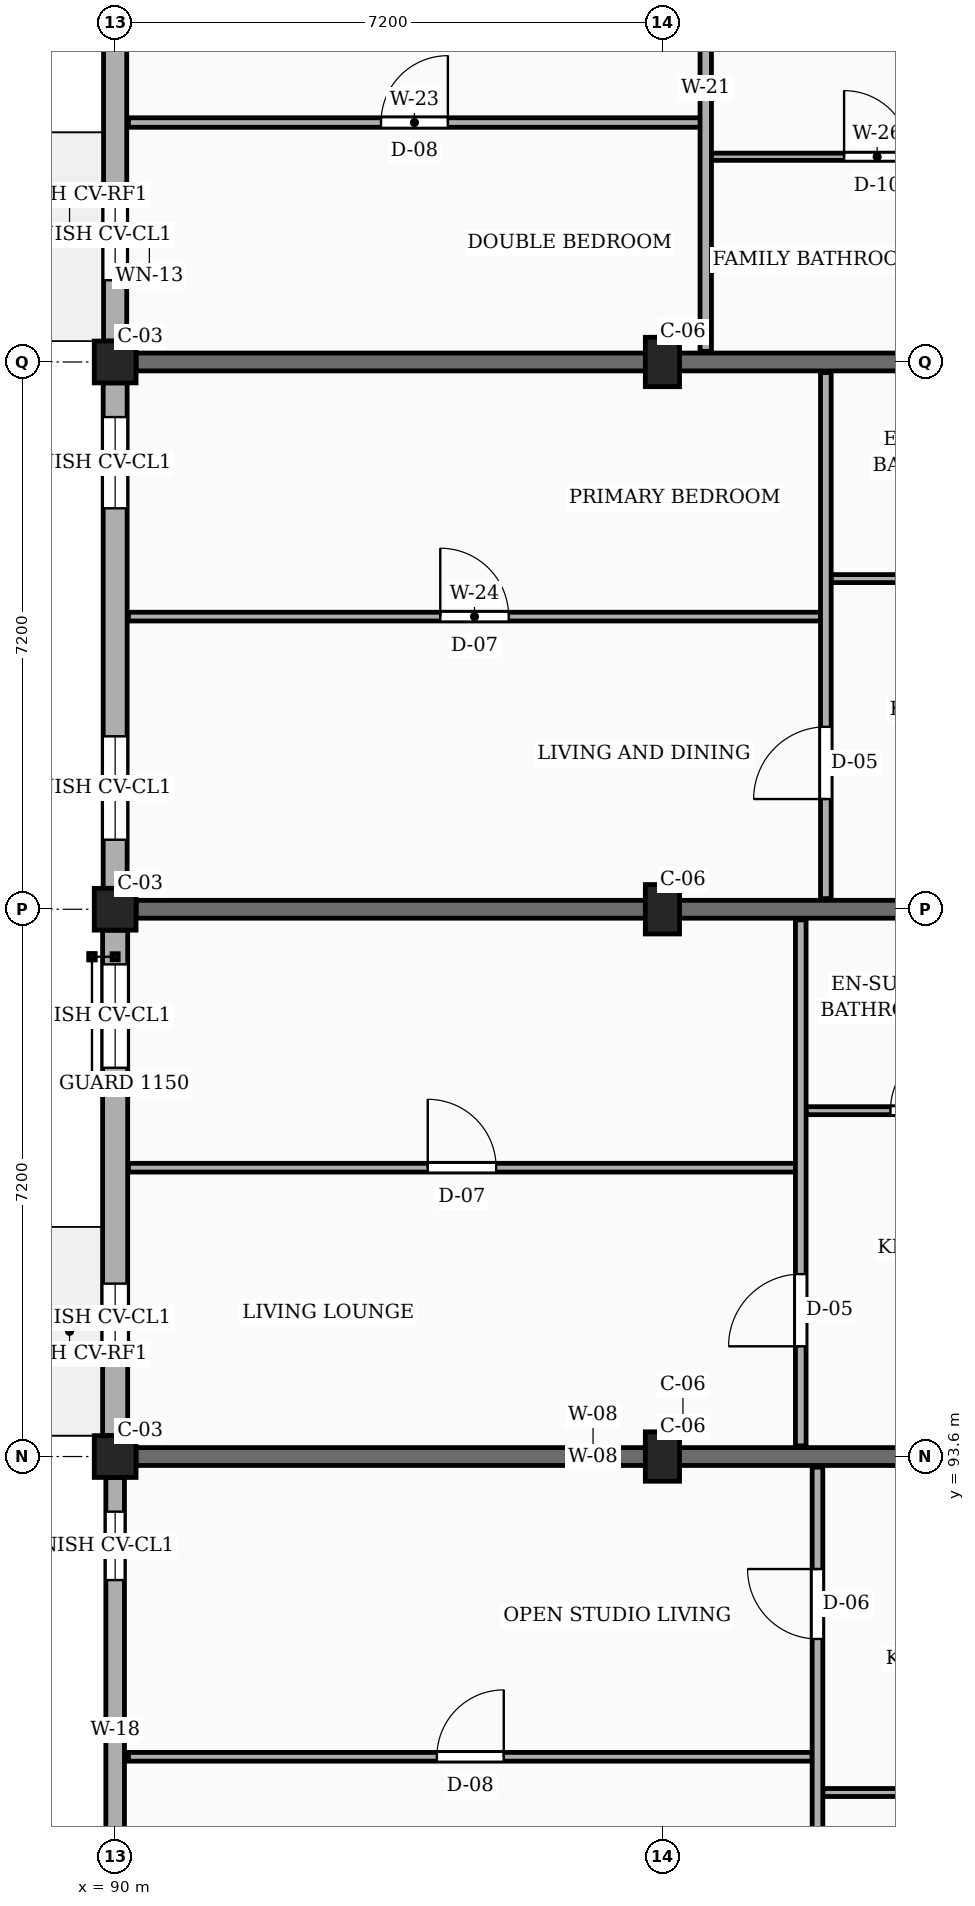
"""IFC4 building model, lengths in metres.
Left out: names, types, materials, properties, quantities, classifications, styles, units other than length and angle.
Written with IfcOpenShell. Run it as: python <this file> out.ifc"""

import sys

from ifc_helpers import new_model, si_unit, direction, frame, frame_2d, origin, origin_2d, place, context, subcontext, project, spatial, rectangle, extrude, element, fill, save


model = new_model("IFC4")
c1 = context("Model", 3, precision=1e-05, world=origin(), true_north=direction((0.0, 1.0)))
c2 = subcontext(c1, "Body", "Model", "MODEL_VIEW")
j1 = project(units=[si_unit("LENGTHUNIT", "METRE"), si_unit("PLANEANGLEUNIT", "RADIAN")], contexts=[c1])
p1 = place(None, origin())
s1 = spatial("IfcSite", under=j1, at=p1, CompositionType="ELEMENT")
p2 = place(p1, origin())
s2 = spatial("IfcBuilding", under=s1, at=p2, CompositionType="ELEMENT")
p3 = place(p2, frame((0.0, 0.0, 20.25)))
s3 = spatial("IfcBuildingStorey", under=s2, at=p3, CompositionType="ELEMENT", Elevation=20.25)
for number, where, z_axis, x_axis in (
    (1, (90.0, 93.6, 0.0), (0.0, 0.0, 1.0), (1.0, 0.0, 0.0)),
    (2, (90.0, 100.8, 0.0), (0.0, 0.0, 1.0), (1.0, 0.0, 0.0)),
    (3, (90.0, 108.0, 0.0), (0.0, 0.0, 1.0), (1.0, 0.0, 0.0)),
):
    element("IfcColumn", number, at=place(p3, frame(where, z_axis=z_axis, x_axis=x_axis)), inside=s3, PredefinedType="COLUMN", context=c2, shape_type="SweptSolid", body=[
        extrude(rectangle(XDim=0.55, YDim=0.55, at=origin_2d()), origin(), (0.0, 0.0, 1.0), 3.15),
    ])
for number, where, z_axis, x_axis in (
    (4, (97.2, 93.6, 0.0), (0.0, 0.0, 1.0), (1.0, 0.0, 0.0)),
    (5, (97.2, 100.8, 0.0), (0.0, 0.0, 1.0), (1.0, 0.0, 0.0)),
    (6, (97.2, 108.0, 0.0), (0.0, 0.0, 1.0), (1.0, 0.0, 0.0)),
):
    element("IfcColumn", number, at=place(p3, frame(where, z_axis=z_axis, x_axis=x_axis)), inside=s3, PredefinedType="COLUMN", context=c2, shape_type="SweptSolid", body=[
        extrude(rectangle(XDim=0.45, YDim=0.65, at=origin_2d()), origin(), (0.0, 0.0, 1.0), 3.15),
    ])
for number, where, z_axis, x_axis in (
    (7, (90.275, 93.6, 0.0), (0.0, 0.0, 1.0), (1.0, 0.0, 0.0)),
    (8, (90.275, 100.8, 0.0), (0.0, 0.0, 1.0), (1.0, 0.0, 0.0)),
    (9, (90.275, 108.0, 0.0), (0.0, 0.0, 1.0), (1.0, 0.0, 0.0)),
):
    element("IfcWall", number, at=place(p3, frame(where, z_axis=z_axis, x_axis=x_axis)), inside=s3, PredefinedType="SOLIDWALL", context=c2, shape_type="SweptSolid", body=[
        extrude(rectangle(XDim=12.025, YDim=0.235, at=frame_2d((6.013, 0.0))), origin(), (0.0, 0.0, 1.0), 2.19),
    ])
p4 = place(p3, frame((90.0, 114.925, 0.0), z_axis=(0.0, 0.0, 1.0), x_axis=(0.0, -1.0, 0.0)))
e10 = element("IfcWall", 10, at=p4, inside=s3, PredefinedType="SOLIDWALL", context=c2, shape_type="SweptSolid", body=[
    extrude(rectangle(XDim=6.65, YDim=0.305, at=frame_2d((3.325, 0.0))), origin(), (0.0, 0.0, 1.0), 2.46),
])
p5 = place(p4, frame((0.45, 0.0, 0.78)))
e11 = element("IfcOpeningElement", 11, at=p5, cuts=e10, PredefinedType="OPENING", context=c2, shape_type="SweptSolid", body=[
    extrude(rectangle(XDim=1.04, YDim=1.26, at=frame_2d((0.52, 0.63))), frame((0.0, 0.163, 0.0), z_axis=(0.0, -1.0, 0.0), x_axis=(1.0, 0.0, 0.0)), (0.0, 0.0, 1.0), 0.325),
])
p6 = place(p4, frame((4.65, 0.0, 0.78)))
e12 = element("IfcOpeningElement", 12, at=p6, cuts=e10, PredefinedType="OPENING", context=c2, shape_type="SweptSolid", body=[
    extrude(rectangle(XDim=1.2, YDim=1.26, at=frame_2d((0.6, 0.63))), frame((0.0, 0.163, 0.0), z_axis=(0.0, -1.0, 0.0), x_axis=(1.0, 0.0, 0.0)), (0.0, 0.0, 1.0), 0.325),
])
p7 = place(p3, frame((90.0, 107.725, 0.0), z_axis=(0.0, 0.0, 1.0), x_axis=(0.0, -1.0, 0.0)))
e13 = element("IfcWall", 13, at=p7, inside=s3, PredefinedType="SOLIDWALL", context=c2, shape_type="SweptSolid", body=[
    extrude(rectangle(XDim=6.65, YDim=0.315, at=frame_2d((3.325, 0.0))), origin(), (0.0, 0.0, 1.0), 2.46),
])
p8 = place(p7, frame((0.45, 0.0, 0.78)))
e14 = element("IfcOpeningElement", 14, at=p8, cuts=e13, PredefinedType="OPENING", context=c2, shape_type="SweptSolid", body=[
    extrude(rectangle(XDim=1.2, YDim=1.26, at=frame_2d((0.6, 0.63))), frame((0.0, 0.167, 0.0), z_axis=(0.0, -1.0, 0.0), x_axis=(1.0, 0.0, 0.0)), (0.0, 0.0, 1.0), 0.335),
])
p9 = place(p7, frame((4.65, 0.0, 0.78)))
e15 = element("IfcOpeningElement", 15, at=p9, cuts=e13, PredefinedType="OPENING", context=c2, shape_type="SweptSolid", body=[
    extrude(rectangle(XDim=1.36, YDim=1.26, at=frame_2d((0.68, 0.63))), frame((0.0, 0.167, 0.0), z_axis=(0.0, -1.0, 0.0), x_axis=(1.0, 0.0, 0.0)), (0.0, 0.0, 1.0), 0.335),
])
p10 = place(p3, frame((90.0, 100.525, 0.0), z_axis=(0.0, 0.0, 1.0), x_axis=(0.0, -1.0, 0.0)))
e16 = element("IfcWall", 16, at=p10, inside=s3, PredefinedType="SOLIDWALL", context=c2, shape_type="SweptSolid", body=[
    extrude(rectangle(XDim=6.65, YDim=0.33, at=frame_2d((3.325, 0.0))), origin(), (0.0, 0.0, 1.0), 2.46),
])
p11 = place(p10, frame((0.45, 0.0, 0.78)))
e17 = element("IfcOpeningElement", 17, at=p11, cuts=e16, PredefinedType="OPENING", context=c2, shape_type="SweptSolid", body=[
    extrude(rectangle(XDim=1.36, YDim=1.26, at=frame_2d((0.68, 0.63))), frame((0.0, 0.175, 0.0), z_axis=(0.0, -1.0, 0.0), x_axis=(1.0, 0.0, 0.0)), (0.0, 0.0, 1.0), 0.35),
])
p12 = place(p10, frame((4.65, 0.0, 0.78)))
e18 = element("IfcOpeningElement", 18, at=p12, cuts=e16, PredefinedType="OPENING", context=c2, shape_type="SweptSolid", body=[
    extrude(rectangle(XDim=0.9, YDim=1.36, at=frame_2d((0.45, 0.68))), frame((0.0, 0.175, 0.0), z_axis=(0.0, -1.0, 0.0), x_axis=(1.0, 0.0, 0.0)), (0.0, 0.0, 1.0), 0.35),
])
p13 = place(p3, frame((90.0, 93.325, 0.0), z_axis=(0.0, 0.0, 1.0), x_axis=(0.0, -1.0, 0.0)))
e19 = element("IfcWall", 19, at=p13, inside=s3, PredefinedType="SOLIDWALL", context=c2, shape_type="SweptSolid", body=[
    extrude(rectangle(XDim=6.65, YDim=0.245, at=frame_2d((3.325, 0.0))), origin(), (0.0, 0.0, 1.0), 2.46),
])
p14 = place(p13, frame((0.45, 0.0, 0.78)))
e20 = element("IfcOpeningElement", 20, at=p14, cuts=e19, PredefinedType="OPENING", context=c2, shape_type="SweptSolid", body=[
    extrude(rectangle(XDim=0.9, YDim=1.36, at=frame_2d((0.45, 0.68))), frame((0.0, 0.133, 0.0), z_axis=(0.0, -1.0, 0.0), x_axis=(1.0, 0.0, 0.0)), (0.0, 0.0, 1.0), 0.265),
])
p15 = place(p13, frame((4.65, 0.0, 0.78)))
e21 = element("IfcOpeningElement", 21, at=p15, cuts=e19, PredefinedType="OPENING", context=c2, shape_type="SweptSolid", body=[
    extrude(rectangle(XDim=1.06, YDim=1.36, at=frame_2d((0.53, 0.68))), frame((0.0, 0.133, 0.0), z_axis=(0.0, -1.0, 0.0), x_axis=(1.0, 0.0, 0.0)), (0.0, 0.0, 1.0), 0.265),
])
p16 = place(p3, frame((90.175, 89.65, 0.0), z_axis=(0.0, 0.0, 1.0), x_axis=(1.0, 0.0, 0.0)))
e22 = element("IfcWall", 22, at=p16, inside=s3, PredefinedType="PARTITIONING", context=c2, shape_type="SweptSolid", body=[
    extrude(rectangle(XDim=8.995, YDim=0.115, at=frame_2d((4.498, 0.0))), origin(), (0.0, 0.0, 1.0), 2.325),
])
p17 = place(p16, frame((4.058, 0.0, 0.0)))
e23 = element("IfcOpeningElement", 23, at=p17, cuts=e22, PredefinedType="OPENING", context=c2, shape_type="SweptSolid", body=[
    extrude(rectangle(XDim=0.88, YDim=2.08, at=frame_2d((0.44, 1.04))), frame((0.0, 0.067, 0.0), z_axis=(0.0, -1.0, 0.0), x_axis=(1.0, 0.0, 0.0)), (0.0, 0.0, 1.0), 0.135),
])
p18 = place(p3, frame((99.31, 89.18, 0.0), z_axis=(0.0, 0.0, 1.0), x_axis=(1.0, 0.0, 0.0)))
e24 = element("IfcWall", 24, at=p18, inside=s3, PredefinedType="PARTITIONING", context=c2, shape_type="SweptSolid", body=[
    extrude(rectangle(XDim=2.9, YDim=0.105, at=frame_2d((1.45, 0.0))), origin(), (0.0, 0.0, 1.0), 2.325),
])
p19 = place(p18, frame((1.015, 0.0, 0.0)))
e25 = element("IfcOpeningElement", 25, at=p19, cuts=e24, PredefinedType="OPENING", context=c2, shape_type="SweptSolid", body=[
    extrude(rectangle(XDim=0.87, YDim=2.05, at=frame_2d((0.435, 1.025))), frame((0.0, 0.062, 0.0), z_axis=(0.0, -1.0, 0.0), x_axis=(1.0, 0.0, 0.0)), (0.0, 0.0, 1.0), 0.125),
])
p20 = place(p3, frame((99.24, 86.575, 0.0), z_axis=(0.0, 0.0, 1.0), x_axis=(0.0, 1.0, 0.0)))
e26 = element("IfcWall", 26, at=p20, inside=s3, PredefinedType="PARTITIONING", context=c2, shape_type="SweptSolid", body=[
    extrude(rectangle(XDim=6.885, YDim=0.14, at=frame_2d((3.442, 0.0))), origin(), (0.0, 0.0, 1.0), 2.325),
])
p21 = place(p20, frame((4.625, 0.0, 0.0)))
e27 = element("IfcOpeningElement", 27, at=p21, cuts=e26, PredefinedType="OPENING", context=c2, shape_type="SweptSolid", body=[
    extrude(rectangle(XDim=0.92, YDim=2.1, at=frame_2d((0.46, 1.05))), frame((0.0, 0.08, 0.0), z_axis=(0.0, -1.0, 0.0), x_axis=(1.0, 0.0, 0.0)), (0.0, 0.0, 1.0), 0.16),
])
p22 = place(p3, frame((90.175, 97.4, 0.0), z_axis=(0.0, 0.0, 1.0), x_axis=(1.0, 0.0, 0.0)))
e28 = element("IfcWall", 28, at=p22, inside=s3, PredefinedType="PARTITIONING", context=c2, shape_type="SweptSolid", body=[
    extrude(rectangle(XDim=8.775, YDim=0.115, at=frame_2d((4.387, 0.0))), origin(), (0.0, 0.0, 1.0), 2.325),
])
p23 = place(p22, frame((3.938, 0.0, 0.0)))
e29 = element("IfcOpeningElement", 29, at=p23, cuts=e28, PredefinedType="OPENING", context=c2, shape_type="SweptSolid", body=[
    extrude(rectangle(XDim=0.9, YDim=2.1, at=frame_2d((0.45, 1.05))), frame((0.0, 0.067, 0.0), z_axis=(0.0, -1.0, 0.0), x_axis=(1.0, 0.0, 0.0)), (0.0, 0.0, 1.0), 0.135),
])
p24 = place(p3, frame((99.09, 98.15, 0.0), z_axis=(0.0, 0.0, 1.0), x_axis=(1.0, 0.0, 0.0)))
e30 = element("IfcWall", 30, at=p24, inside=s3, PredefinedType="PARTITIONING", context=c2, shape_type="SweptSolid", body=[
    extrude(rectangle(XDim=3.12, YDim=0.105, at=frame_2d((1.56, 0.0))), origin(), (0.0, 0.0, 1.0), 2.325),
])
p25 = place(p24, frame((1.11, 0.0, 0.0)))
e31 = element("IfcOpeningElement", 31, at=p25, cuts=e30, PredefinedType="OPENING", context=c2, shape_type="SweptSolid", body=[
    extrude(rectangle(XDim=0.9, YDim=2.05, at=frame_2d((0.45, 1.025))), frame((0.0, 0.062, 0.0), z_axis=(0.0, -1.0, 0.0), x_axis=(1.0, 0.0, 0.0)), (0.0, 0.0, 1.0), 0.125),
])
p26 = place(p3, frame((99.02, 93.74, 0.0), z_axis=(0.0, 0.0, 1.0), x_axis=(0.0, 1.0, 0.0)))
e32 = element("IfcWall", 32, at=p26, inside=s3, PredefinedType="PARTITIONING", context=c2, shape_type="SweptSolid", body=[
    extrude(rectangle(XDim=6.92, YDim=0.14, at=frame_2d((3.46, 0.0))), origin(), (0.0, 0.0, 1.0), 2.325),
])
p27 = place(p26, frame((1.31, 0.0, 0.0)))
e33 = element("IfcOpeningElement", 33, at=p27, cuts=e32, PredefinedType="OPENING", context=c2, shape_type="SweptSolid", body=[
    extrude(rectangle(XDim=0.95, YDim=2.1, at=frame_2d((0.475, 1.05))), frame((0.0, 0.08, 0.0), z_axis=(0.0, -1.0, 0.0), x_axis=(1.0, 0.0, 0.0)), (0.0, 0.0, 1.0), 0.16),
])
p28 = place(p3, frame((90.175, 104.65, 0.0), z_axis=(0.0, 0.0, 1.0), x_axis=(1.0, 0.0, 0.0)))
e34 = element("IfcWall", 34, at=p28, inside=s3, PredefinedType="PARTITIONING", context=c2, shape_type="SweptSolid", body=[
    extrude(rectangle(XDim=9.105, YDim=0.115, at=frame_2d((4.552, 0.0))), origin(), (0.0, 0.0, 1.0), 2.325),
])
p29 = place(p28, frame((4.103, 0.0, 0.0)))
e35 = element("IfcOpeningElement", 35, at=p29, cuts=e34, PredefinedType="OPENING", context=c2, shape_type="SweptSolid", body=[
    extrude(rectangle(XDim=0.9, YDim=2.1, at=frame_2d((0.45, 1.05))), frame((0.0, 0.067, 0.0), z_axis=(0.0, -1.0, 0.0), x_axis=(1.0, 0.0, 0.0)), (0.0, 0.0, 1.0), 0.135),
])
p30 = place(p3, frame((99.42, 105.15, 0.0), z_axis=(0.0, 0.0, 1.0), x_axis=(1.0, 0.0, 0.0)))
e36 = element("IfcWall", 36, at=p30, inside=s3, PredefinedType="PARTITIONING", context=c2, shape_type="SweptSolid", body=[
    extrude(rectangle(XDim=2.79, YDim=0.105, at=frame_2d((1.395, 0.0))), origin(), (0.0, 0.0, 1.0), 2.325),
])
p31 = place(p30, frame((0.945, 0.0, 0.0)))
e37 = element("IfcOpeningElement", 37, at=p31, cuts=e36, PredefinedType="OPENING", context=c2, shape_type="SweptSolid", body=[
    extrude(rectangle(XDim=0.9, YDim=2.05, at=frame_2d((0.45, 1.025))), frame((0.0, 0.062, 0.0), z_axis=(0.0, -1.0, 0.0), x_axis=(1.0, 0.0, 0.0)), (0.0, 0.0, 1.0), 0.125),
])
p32 = place(p3, frame((99.35, 100.94, 0.0), z_axis=(0.0, 0.0, 1.0), x_axis=(0.0, 1.0, 0.0)))
e38 = element("IfcWall", 38, at=p32, inside=s3, PredefinedType="PARTITIONING", context=c2, shape_type="SweptSolid", body=[
    extrude(rectangle(XDim=6.92, YDim=0.14, at=frame_2d((3.46, 0.0))), origin(), (0.0, 0.0, 1.0), 2.325),
])
p33 = place(p32, frame((1.31, 0.0, 0.0)))
e39 = element("IfcOpeningElement", 39, at=p33, cuts=e38, PredefinedType="OPENING", context=c2, shape_type="SweptSolid", body=[
    extrude(rectangle(XDim=0.95, YDim=2.1, at=frame_2d((0.475, 1.05))), frame((0.0, 0.08, 0.0), z_axis=(0.0, -1.0, 0.0), x_axis=(1.0, 0.0, 0.0)), (0.0, 0.0, 1.0), 0.16),
])
p34 = place(p3, frame((90.175, 111.15, 0.0), z_axis=(0.0, 0.0, 1.0), x_axis=(1.0, 0.0, 0.0)))
e40 = element("IfcWall", 40, at=p34, inside=s3, PredefinedType="PARTITIONING", context=c2, shape_type="SweptSolid", body=[
    extrude(rectangle(XDim=7.525, YDim=0.125, at=frame_2d((3.762, 0.0))), origin(), (0.0, 0.0, 1.0), 2.325),
])
p35 = place(p34, frame((3.323, 0.0, 0.0)))
e41 = element("IfcOpeningElement", 41, at=p35, cuts=e40, PredefinedType="OPENING", context=c2, shape_type="SweptSolid", body=[
    extrude(rectangle(XDim=0.88, YDim=2.08, at=frame_2d((0.44, 1.04))), frame((0.0, 0.073, 0.0), z_axis=(0.0, -1.0, 0.0), x_axis=(1.0, 0.0, 0.0)), (0.0, 0.0, 1.0), 0.145),
])
p36 = place(p3, frame((97.84, 110.7, 0.0), z_axis=(0.0, 0.0, 1.0), x_axis=(1.0, 0.0, 0.0)))
e42 = element("IfcWall", 42, at=p36, inside=s3, PredefinedType="PARTITIONING", context=c2, shape_type="SweptSolid", body=[
    extrude(rectangle(XDim=4.37, YDim=0.095, at=frame_2d((2.185, 0.0))), origin(), (0.0, 0.0, 1.0), 2.325),
])
p37 = place(p36, frame((1.75, 0.0, 0.0)))
e43 = element("IfcOpeningElement", 43, at=p37, cuts=e42, PredefinedType="OPENING", context=c2, shape_type="SweptSolid", body=[
    extrude(rectangle(XDim=0.87, YDim=2.05, at=frame_2d((0.435, 1.025))), frame((0.0, 0.058, 0.0), z_axis=(0.0, -1.0, 0.0), x_axis=(1.0, 0.0, 0.0)), (0.0, 0.0, 1.0), 0.115),
])
p38 = place(p3, frame((97.77, 108.14, 0.0), z_axis=(0.0, 0.0, 1.0), x_axis=(0.0, 1.0, 0.0)))
e44 = element("IfcWall", 44, at=p38, inside=s3, PredefinedType="PARTITIONING", context=c2, shape_type="SweptSolid", body=[
    extrude(rectangle(XDim=6.92, YDim=0.15, at=frame_2d((3.46, 0.0))), origin(), (0.0, 0.0, 1.0), 2.325),
])
p39 = place(p38, frame((4.66, 0.0, 0.0)))
e45 = element("IfcOpeningElement", 45, at=p39, cuts=e44, PredefinedType="OPENING", context=c2, shape_type="SweptSolid", body=[
    extrude(rectangle(XDim=0.92, YDim=2.1, at=frame_2d((0.46, 1.05))), frame((0.0, 0.085, 0.0), z_axis=(0.0, -1.0, 0.0), x_axis=(1.0, 0.0, 0.0)), (0.0, 0.0, 1.0), 0.17),
])
p40 = place(p6, origin())
e46 = element("IfcWindow", 46, at=p40, inside=s3, PartitioningType="SINGLE_PANEL", PredefinedType="WINDOW", context=c2, shape_type="SweptSolid", body=[
    extrude(rectangle(XDim=1.2, YDim=1.26, at=frame_2d((0.6, 0.63))), frame((0.0, 0.03, 0.0), z_axis=(0.0, -1.0, 0.0), x_axis=(1.0, 0.0, 0.0)), (0.0, 0.0, 1.0), 0.06),
])
fill(e12, e46)
p41 = place(p8, origin())
e47 = element("IfcWindow", 47, at=p41, inside=s3, PartitioningType="SINGLE_PANEL", PredefinedType="WINDOW", context=c2, shape_type="SweptSolid", body=[
    extrude(rectangle(XDim=1.2, YDim=1.26, at=frame_2d((0.6, 0.63))), frame((0.0, 0.03, 0.0), z_axis=(0.0, -1.0, 0.0), x_axis=(1.0, 0.0, 0.0)), (0.0, 0.0, 1.0), 0.06),
])
fill(e14, e47)
p42 = place(p9, origin())
e48 = element("IfcWindow", 48, at=p42, inside=s3, PartitioningType="SINGLE_PANEL", PredefinedType="WINDOW", context=c2, shape_type="SweptSolid", body=[
    extrude(rectangle(XDim=1.36, YDim=1.26, at=frame_2d((0.68, 0.63))), frame((0.0, 0.03, 0.0), z_axis=(0.0, -1.0, 0.0), x_axis=(1.0, 0.0, 0.0)), (0.0, 0.0, 1.0), 0.06),
])
fill(e15, e48)
p43 = place(p11, origin())
e49 = element("IfcWindow", 49, at=p43, inside=s3, PartitioningType="SINGLE_PANEL", PredefinedType="WINDOW", context=c2, shape_type="SweptSolid", body=[
    extrude(rectangle(XDim=1.36, YDim=1.26, at=frame_2d((0.68, 0.63))), frame((0.0, 0.03, 0.0), z_axis=(0.0, -1.0, 0.0), x_axis=(1.0, 0.0, 0.0)), (0.0, 0.0, 1.0), 0.06),
])
fill(e17, e49)
p44 = place(p12, origin())
e50 = element("IfcWindow", 50, at=p44, inside=s3, PartitioningType="SINGLE_PANEL", PredefinedType="WINDOW", context=c2, shape_type="SweptSolid", body=[
    extrude(rectangle(XDim=0.9, YDim=1.36, at=frame_2d((0.45, 0.68))), frame((0.0, 0.03, 0.0), z_axis=(0.0, -1.0, 0.0), x_axis=(1.0, 0.0, 0.0)), (0.0, 0.0, 1.0), 0.06),
])
fill(e18, e50)
p45 = place(p14, origin())
e51 = element("IfcWindow", 51, at=p45, inside=s3, PartitioningType="SINGLE_PANEL", PredefinedType="WINDOW", context=c2, shape_type="SweptSolid", body=[
    extrude(rectangle(XDim=0.9, YDim=1.36, at=frame_2d((0.45, 0.68))), frame((0.0, 0.03, 0.0), z_axis=(0.0, -1.0, 0.0), x_axis=(1.0, 0.0, 0.0)), (0.0, 0.0, 1.0), 0.06),
])
fill(e20, e51)
p46 = place(p17, origin())
e52 = element("IfcDoor", 52, at=p46, inside=s3, OperationType="SINGLE_SWING_RIGHT", PredefinedType="DOOR", context=c2, shape_type="SweptSolid", body=[
    extrude(rectangle(XDim=0.88, YDim=2.08, at=frame_2d((0.44, 1.04))), frame((0.0, 0.025, 0.0), z_axis=(0.0, -1.0, 0.0), x_axis=(1.0, 0.0, 0.0)), (0.0, 0.0, 1.0), 0.05),
])
fill(e23, e52)
p47 = place(p21, origin())
e53 = element("IfcDoor", 53, at=p47, inside=s3, OperationType="SINGLE_SWING_RIGHT", PredefinedType="DOOR", context=c2, shape_type="SweptSolid", body=[
    extrude(rectangle(XDim=0.92, YDim=2.1, at=frame_2d((0.46, 1.05))), frame((0.0, 0.025, 0.0), z_axis=(0.0, -1.0, 0.0), x_axis=(1.0, 0.0, 0.0)), (0.0, 0.0, 1.0), 0.05),
])
fill(e27, e53)
p48 = place(p23, origin())
e54 = element("IfcDoor", 54, at=p48, inside=s3, OperationType="SINGLE_SWING_LEFT", PredefinedType="DOOR", context=c2, shape_type="SweptSolid", body=[
    extrude(rectangle(XDim=0.9, YDim=2.1, at=frame_2d((0.45, 1.05))), frame((0.0, 0.025, 0.0), z_axis=(0.0, -1.0, 0.0), x_axis=(1.0, 0.0, 0.0)), (0.0, 0.0, 1.0), 0.05),
])
fill(e29, e54)
p49 = place(p25, origin())
e55 = element("IfcDoor", 55, at=p49, inside=s3, OperationType="SINGLE_SWING_RIGHT", PredefinedType="DOOR", context=c2, shape_type="SweptSolid", body=[
    extrude(rectangle(XDim=0.9, YDim=2.05, at=frame_2d((0.45, 1.025))), frame((0.0, 0.025, 0.0), z_axis=(0.0, -1.0, 0.0), x_axis=(1.0, 0.0, 0.0)), (0.0, 0.0, 1.0), 0.05),
])
fill(e31, e55)
p50 = place(p27, origin())
e56 = element("IfcDoor", 56, at=p50, inside=s3, OperationType="SINGLE_SWING_LEFT", PredefinedType="DOOR", context=c2, shape_type="SweptSolid", body=[
    extrude(rectangle(XDim=0.95, YDim=2.1, at=frame_2d((0.475, 1.05))), frame((0.0, 0.025, 0.0), z_axis=(0.0, -1.0, 0.0), x_axis=(1.0, 0.0, 0.0)), (0.0, 0.0, 1.0), 0.05),
])
fill(e33, e56)
p51 = place(p29, origin())
e57 = element("IfcDoor", 57, at=p51, inside=s3, OperationType="SINGLE_SWING_LEFT", PredefinedType="DOOR", context=c2, shape_type="SweptSolid", body=[
    extrude(rectangle(XDim=0.9, YDim=2.1, at=frame_2d((0.45, 1.05))), frame((0.0, 0.025, 0.0), z_axis=(0.0, -1.0, 0.0), x_axis=(1.0, 0.0, 0.0)), (0.0, 0.0, 1.0), 0.05),
])
fill(e35, e57)
p52 = place(p33, origin())
e58 = element("IfcDoor", 58, at=p52, inside=s3, OperationType="SINGLE_SWING_LEFT", PredefinedType="DOOR", context=c2, shape_type="SweptSolid", body=[
    extrude(rectangle(XDim=0.95, YDim=2.1, at=frame_2d((0.475, 1.05))), frame((0.0, 0.025, 0.0), z_axis=(0.0, -1.0, 0.0), x_axis=(1.0, 0.0, 0.0)), (0.0, 0.0, 1.0), 0.05),
])
fill(e39, e58)
p53 = place(p35, origin())
e59 = element("IfcDoor", 59, at=p53, inside=s3, OperationType="SINGLE_SWING_RIGHT", PredefinedType="DOOR", context=c2, shape_type="SweptSolid", body=[
    extrude(rectangle(XDim=0.88, YDim=2.08, at=frame_2d((0.44, 1.04))), frame((0.0, 0.025, 0.0), z_axis=(0.0, -1.0, 0.0), x_axis=(1.0, 0.0, 0.0)), (0.0, 0.0, 1.0), 0.05),
])
fill(e41, e59)
p54 = place(p37, origin())
e60 = element("IfcDoor", 60, at=p54, inside=s3, OperationType="SINGLE_SWING_LEFT", PredefinedType="DOOR", context=c2, shape_type="SweptSolid", body=[
    extrude(rectangle(XDim=0.87, YDim=2.05, at=frame_2d((0.435, 1.025))), frame((0.0, 0.025, 0.0), z_axis=(0.0, -1.0, 0.0), x_axis=(1.0, 0.0, 0.0)), (0.0, 0.0, 1.0), 0.05),
])
fill(e43, e60)
save(model, sys.argv[1])
